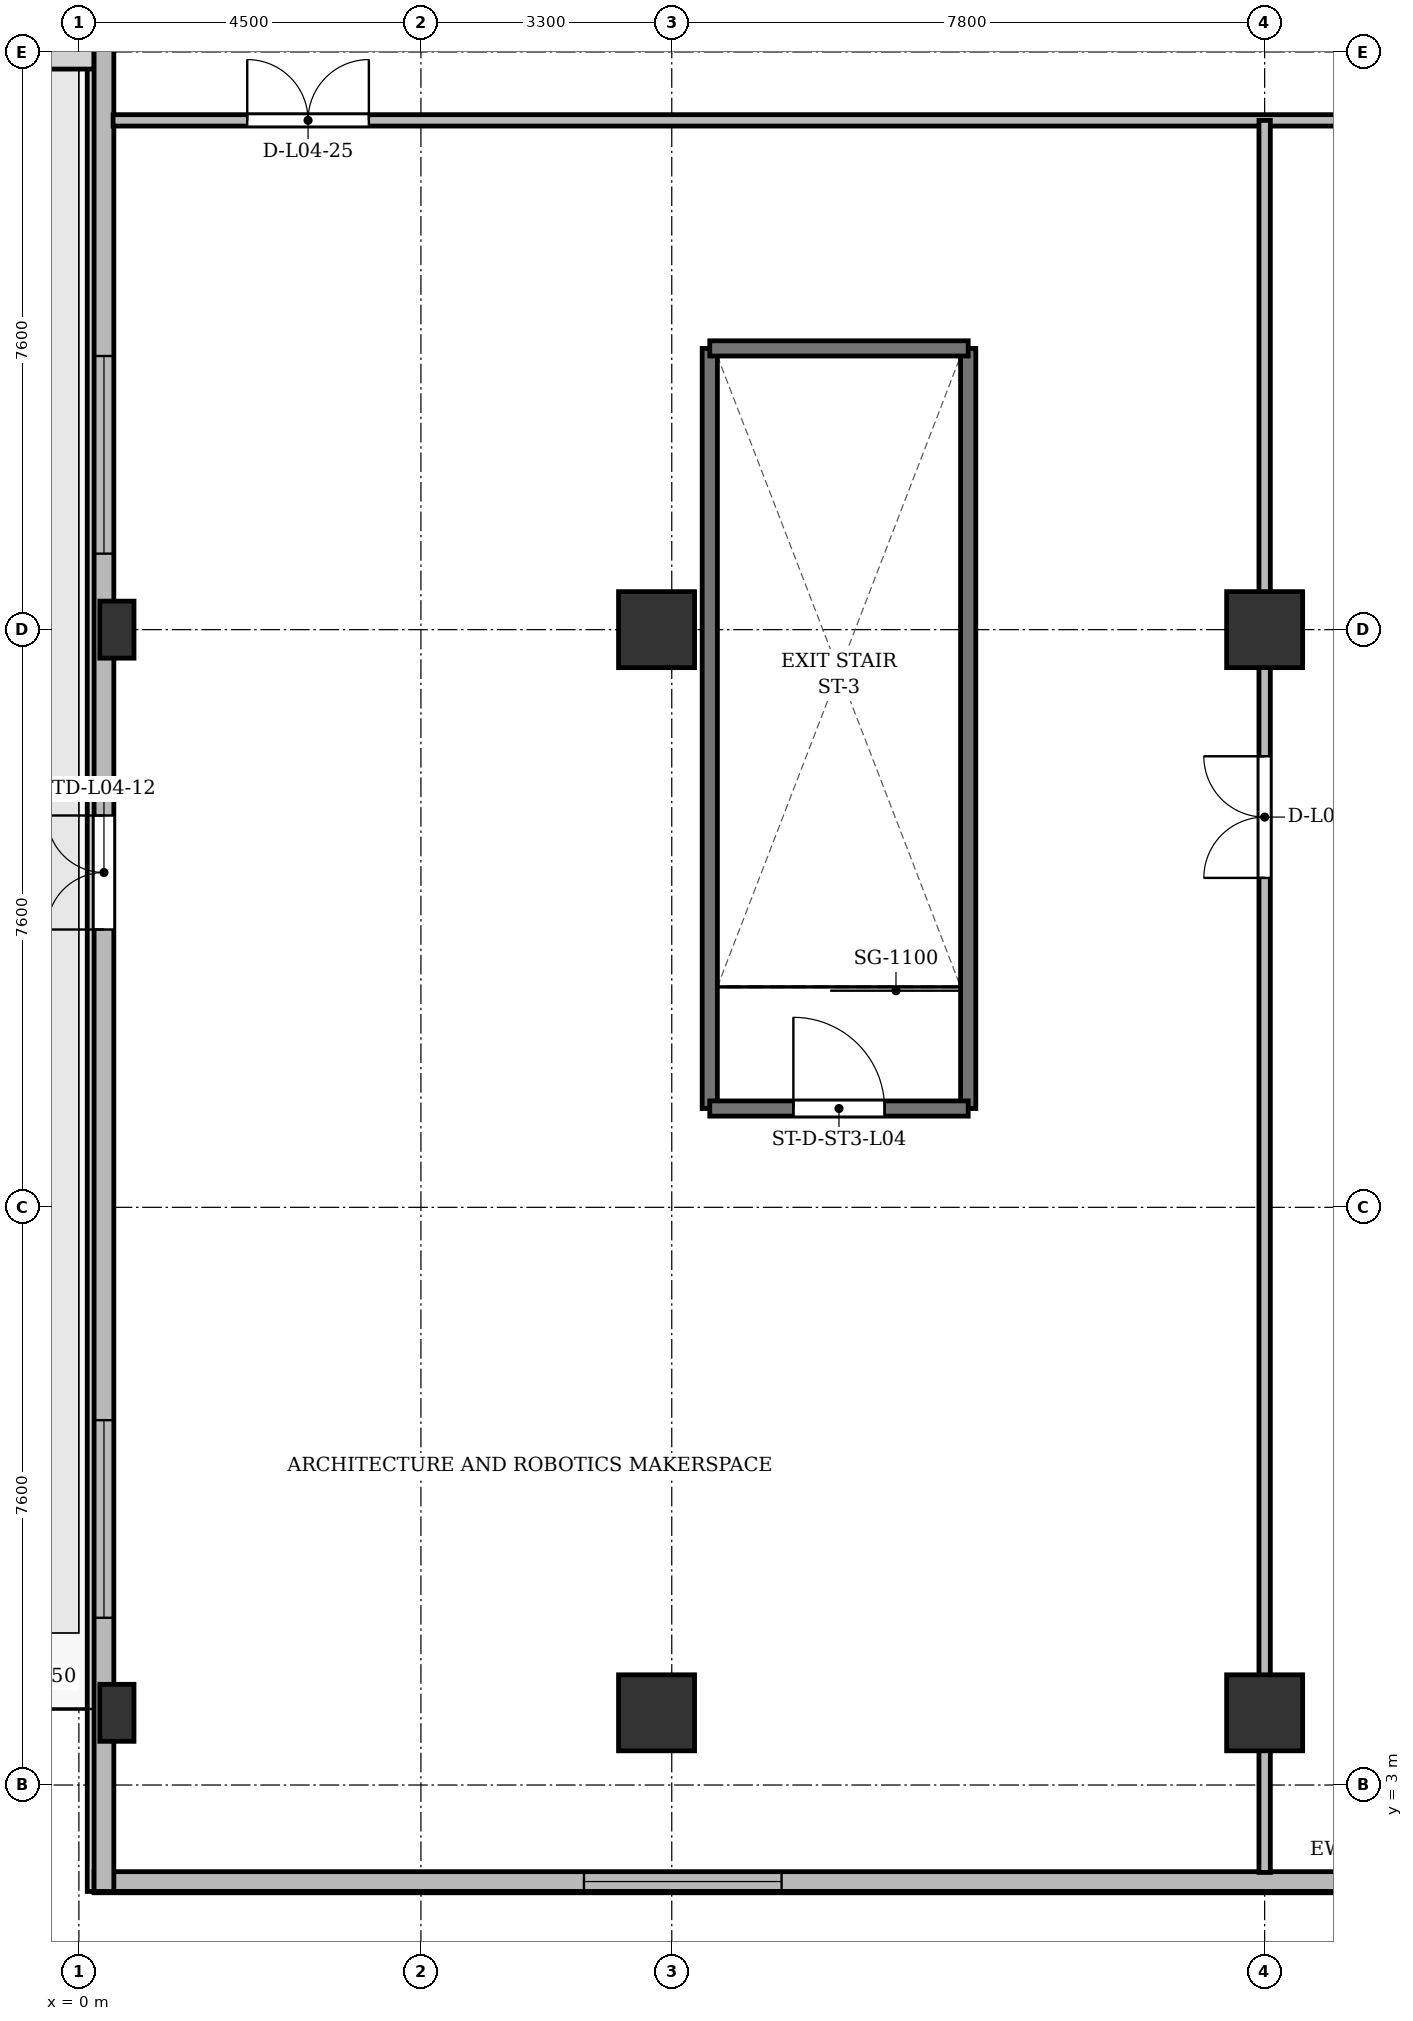
"""IFC4 building model, lengths in metres.
Left out: names, types, materials, properties, quantities, classifications, styles, units other than length and angle.
Written with IfcOpenShell. Run it as: python <this file> out.ifc"""

import sys

from ifc_helpers import new_model, si_unit, direction, frame, frame_2d, origin, origin_2d, place, context, subcontext, project, spatial, rectangle, extrude, source, transform, mapped, element, fill, save


model = new_model("IFC4")
c1 = context("Model", 3, precision=1e-05, world=origin(), true_north=direction((0.0, 1.0)))
c2 = subcontext(c1, "Body", "Model", "MODEL_VIEW")
j1 = project(units=[si_unit("LENGTHUNIT", "METRE"), si_unit("PLANEANGLEUNIT", "RADIAN")], contexts=[c1])
p1 = place(None, origin())
s1 = spatial("IfcSite", under=j1, at=p1, CompositionType="ELEMENT")
p2 = place(p1, origin())
s2 = spatial("IfcBuilding", under=s1, at=p2, CompositionType="ELEMENT")
p3 = place(p2, frame((0.0, 0.0, 18.7)))
s3 = spatial("IfcBuildingStorey", under=s2, at=p3, CompositionType="ELEMENT", Elevation=18.7)
m1 = source(origin(), c2, "Body", "SweptSolid", [
    extrude(rectangle(XDim=0.45, YDim=0.75, at=origin_2d()), origin(), (0.0, 0.0, 1.0), 4.8),
])
for number, where, z_axis, x_axis in (
    (1, (0.5, 3.95, 0.0), (0.0, 0.0, 1.0), (1.0, 0.0, 0.0)),
    (2, (0.5, 18.2, 0.0), (0.0, 0.0, 1.0), (1.0, 0.0, 0.0)),
):
    element("IfcColumn", number, at=place(p3, frame(where, z_axis=z_axis, x_axis=x_axis)), inside=s3, PredefinedType="PILASTER", context=c2, shape_type="MappedRepresentation", body=[
        mapped(m1, transform((0.0, 0.0, 0.0), x_axis=(1.0, 0.0, 0.0), y_axis=(0.0, 1.0, 0.0), z_axis=(0.0, 0.0, 1.0), scale=1.0)),
    ])
m2 = source(origin(), c2, "Body", "SweptSolid", [
    extrude(rectangle(XDim=1.0, YDim=1.0, at=origin_2d()), origin(), (0.0, 0.0, 1.0), 4.8),
])
for number, where, z_axis, x_axis in (
    (3, (7.6, 3.95, 0.0), (0.0, 0.0, 1.0), (1.0, 0.0, 0.0)),
    (4, (7.6, 18.2, 0.0), (0.0, 0.0, 1.0), (1.0, 0.0, 0.0)),
    (5, (15.6, 3.95, 0.0), (0.0, 0.0, 1.0), (1.0, 0.0, 0.0)),
    (6, (15.6, 18.2, 0.0), (0.0, 0.0, 1.0), (1.0, 0.0, 0.0)),
):
    element("IfcColumn", number, at=place(p3, frame(where, z_axis=z_axis, x_axis=x_axis)), inside=s3, PredefinedType="COLUMN", context=c2, shape_type="MappedRepresentation", body=[
        mapped(m2, transform((0.0, 0.0, 0.0), x_axis=(1.0, 0.0, 0.0), y_axis=(0.0, 1.0, 0.0), z_axis=(0.0, 0.0, 1.0), scale=1.0)),
    ])
p4 = place(p3, frame((33.2, 1.73, 0.0), z_axis=(0.0, 0.0, 1.0), x_axis=(-1.0, 0.0, 0.0)))
e7 = element("IfcWall", 7, at=p4, inside=s3, PredefinedType="SOLIDWALL", context=c2, shape_type="SweptSolid", body=[
    extrude(rectangle(XDim=33.0, YDim=0.26, at=frame_2d((16.5, 0.0))), origin(), (0.0, 0.0, 1.0), 4.42),
])
p5 = place(p4, frame((1.345, 0.0, 0.9)))
e8 = element("IfcOpeningElement", 8, at=p5, cuts=e7, PredefinedType="OPENING", context=c2, shape_type="SweptSolid", body=[
    extrude(rectangle(XDim=2.6, YDim=1.9, at=frame_2d((1.3, 0.95))), frame((0.0, 0.14, 0.0), z_axis=(0.0, -1.0, 0.0), x_axis=(1.0, 0.0, 0.0)), (0.0, 0.0, 1.0), 0.28),
])
p6 = place(p4, frame((10.2, 0.0, 0.9)))
e9 = element("IfcOpeningElement", 9, at=p6, cuts=e7, PredefinedType="OPENING", context=c2, shape_type="SweptSolid", body=[
    extrude(rectangle(XDim=2.4, YDim=2.1, at=frame_2d((1.2, 1.05))), frame((0.0, 0.14, 0.0), z_axis=(0.0, -1.0, 0.0), x_axis=(1.0, 0.0, 0.0)), (0.0, 0.0, 1.0), 0.28),
])
p7 = place(p4, frame((23.955, 0.0, 0.9)))
e10 = element("IfcOpeningElement", 10, at=p7, cuts=e7, PredefinedType="OPENING", context=c2, shape_type="SweptSolid", body=[
    extrude(rectangle(XDim=2.6, YDim=1.9, at=frame_2d((1.3, 0.95))), frame((0.0, 0.14, 0.0), z_axis=(0.0, -1.0, 0.0), x_axis=(1.0, 0.0, 0.0)), (0.0, 0.0, 1.0), 0.28),
])
p8 = place(p3, frame((0.33, 1.6, 0.0), z_axis=(0.0, 0.0, 1.0), x_axis=(0.0, 1.0, 0.0)))
e11 = element("IfcWall", 11, at=p8, inside=s3, PredefinedType="SOLIDWALL", context=c2, shape_type="SweptSolid", body=[
    extrude(rectangle(XDim=51.0, YDim=0.26, at=frame_2d((25.5, 0.0))), origin(), (0.0, 0.0, 1.0), 2.62),
])
p9 = place(p8, frame((12.655, 0.0, 0.0)))
e12 = element("IfcOpeningElement", 12, at=p9, cuts=e11, PredefinedType="OPENING", context=c2, shape_type="SweptSolid", body=[
    extrude(rectangle(XDim=1.5, YDim=2.25, at=frame_2d((0.75, 1.125))), frame((0.0, 0.14, 0.0), z_axis=(0.0, -1.0, 0.0), x_axis=(1.0, 0.0, 0.0)), (0.0, 0.0, 1.0), 0.28),
])
p10 = place(p8, frame((3.6, 0.0, 0.92)))
e13 = element("IfcOpeningElement", 13, at=p10, cuts=e11, PredefinedType="OPENING", context=c2, shape_type="SweptSolid", body=[
    extrude(rectangle(XDim=2.6, YDim=1.6, at=frame_2d((1.3, 0.8))), frame((0.0, 0.14, 0.0), z_axis=(0.0, -1.0, 0.0), x_axis=(1.0, 0.0, 0.0)), (0.0, 0.0, 1.0), 0.28),
])
p11 = place(p8, frame((17.6, 0.0, 0.92)))
e14 = element("IfcOpeningElement", 14, at=p11, cuts=e11, PredefinedType="OPENING", context=c2, shape_type="SweptSolid", body=[
    extrude(rectangle(XDim=2.6, YDim=1.6, at=frame_2d((1.3, 0.8))), frame((0.0, 0.14, 0.0), z_axis=(0.0, -1.0, 0.0), x_axis=(1.0, 0.0, 0.0)), (0.0, 0.0, 1.0), 0.28),
])
p12 = place(p8, frame((33.9, 0.0, 0.92)))
e15 = element("IfcOpeningElement", 15, at=p12, cuts=e11, PredefinedType="OPENING", context=c2, shape_type="SweptSolid", body=[
    extrude(rectangle(XDim=2.6, YDim=1.6, at=frame_2d((1.3, 0.8))), frame((0.0, 0.14, 0.0), z_axis=(0.0, -1.0, 0.0), x_axis=(1.0, 0.0, 0.0)), (0.0, 0.0, 1.0), 0.28),
])
p13 = place(p8, frame((40.3, 0.0, 0.92)))
e16 = element("IfcOpeningElement", 16, at=p13, cuts=e11, PredefinedType="OPENING", context=c2, shape_type="SweptSolid", body=[
    extrude(rectangle(XDim=2.6, YDim=1.6, at=frame_2d((1.3, 0.8))), frame((0.0, 0.14, 0.0), z_axis=(0.0, -1.0, 0.0), x_axis=(1.0, 0.0, 0.0)), (0.0, 0.0, 1.0), 0.28),
])
for number, where, z_axis, x_axis in (
    (17, (8.3, 11.9, 0.0), (0.0, 0.0, 1.0), (0.0, 1.0, 0.0)),
    (18, (11.7, 11.9, 0.0), (0.0, 0.0, 1.0), (0.0, 1.0, 0.0)),
):
    element("IfcWall", number, at=place(p3, frame(where, z_axis=z_axis, x_axis=x_axis)), inside=s3, PredefinedType="SHEAR", context=c2, shape_type="SweptSolid", body=[
        extrude(rectangle(XDim=10.0, YDim=0.2, at=frame_2d((5.0, 0.0))), origin(), (0.0, 0.0, 1.0), 4.42),
    ])
p14 = place(p3, frame((8.3, 11.9, 0.0), z_axis=(0.0, 0.0, 1.0), x_axis=(1.0, 0.0, 0.0)))
e19 = element("IfcWall", 19, at=p14, inside=s3, PredefinedType="SHEAR", context=c2, shape_type="SweptSolid", body=[
    extrude(rectangle(XDim=3.4, YDim=0.2, at=frame_2d((1.7, 0.0))), origin(), (0.0, 0.0, 1.0), 4.42),
])
p15 = place(p14, frame((1.1, 0.0, 0.0)))
e20 = element("IfcOpeningElement", 20, at=p15, cuts=e19, PredefinedType="OPENING", context=c2, shape_type="SweptSolid", body=[
    extrude(rectangle(XDim=1.2, YDim=2.15, at=frame_2d((0.6, 1.075))), frame((0.0, 0.11, 0.0), z_axis=(0.0, -1.0, 0.0), x_axis=(1.0, 0.0, 0.0)), (0.0, 0.0, 1.0), 0.22),
])
p16 = place(p3, frame((8.3, 21.9, 0.0), z_axis=(0.0, 0.0, 1.0), x_axis=(1.0, 0.0, 0.0)))
e21 = element("IfcWall", 21, at=p16, inside=s3, PredefinedType="SHEAR", context=c2, shape_type="SweptSolid", body=[
    extrude(rectangle(XDim=3.4, YDim=0.2, at=frame_2d((1.7, 0.0))), origin(), (0.0, 0.0, 1.0), 4.42),
])
p17 = place(p3, frame((0.45, 24.9, 0.0), z_axis=(0.0, 0.0, 1.0), x_axis=(1.0, 0.0, 0.0)))
e22 = element("IfcWall", 22, at=p17, inside=s3, PredefinedType="PARTITIONING", context=c2, shape_type="SweptSolid", body=[
    extrude(rectangle(XDim=73.5, YDim=0.15, at=frame_2d((36.75, 0.0))), origin(), (0.0, 0.0, 1.0), 2.92),
])
p18 = place(p17, frame((1.765, 0.0, 0.0)))
e23 = element("IfcOpeningElement", 23, at=p18, cuts=e22, PredefinedType="OPENING", context=c2, shape_type="SweptSolid", body=[
    extrude(rectangle(XDim=1.6, YDim=2.2, at=frame_2d((0.8, 1.1))), frame((0.0, 0.085, 0.0), z_axis=(0.0, -1.0, 0.0), x_axis=(1.0, 0.0, 0.0)), (0.0, 0.0, 1.0), 0.17),
])
p19 = place(p17, frame((18.459, 0.0, 0.0)))
e24 = element("IfcOpeningElement", 24, at=p19, cuts=e22, PredefinedType="OPENING", context=c2, shape_type="SweptSolid", body=[
    extrude(rectangle(XDim=1.6, YDim=2.2, at=frame_2d((0.8, 1.1))), frame((0.0, 0.085, 0.0), z_axis=(0.0, -1.0, 0.0), x_axis=(1.0, 0.0, 0.0)), (0.0, 0.0, 1.0), 0.17),
])
p20 = place(p17, frame((32.478, 0.0, 0.0)))
e25 = element("IfcOpeningElement", 25, at=p20, cuts=e22, PredefinedType="OPENING", context=c2, shape_type="SweptSolid", body=[
    extrude(rectangle(XDim=1.6, YDim=2.2, at=frame_2d((0.8, 1.1))), frame((0.0, 0.085, 0.0), z_axis=(0.0, -1.0, 0.0), x_axis=(1.0, 0.0, 0.0)), (0.0, 0.0, 1.0), 0.17),
])
p21 = place(p17, frame((46.108, 0.0, 0.0)))
e26 = element("IfcOpeningElement", 26, at=p21, cuts=e22, PredefinedType="OPENING", context=c2, shape_type="SweptSolid", body=[
    extrude(rectangle(XDim=1.6, YDim=2.2, at=frame_2d((0.8, 1.1))), frame((0.0, 0.085, 0.0), z_axis=(0.0, -1.0, 0.0), x_axis=(1.0, 0.0, 0.0)), (0.0, 0.0, 1.0), 0.17),
])
p22 = place(p17, frame((57.594, 0.0, 0.0)))
e27 = element("IfcOpeningElement", 27, at=p22, cuts=e22, PredefinedType="OPENING", context=c2, shape_type="SweptSolid", body=[
    extrude(rectangle(XDim=1.6, YDim=2.2, at=frame_2d((0.8, 1.1))), frame((0.0, 0.085, 0.0), z_axis=(0.0, -1.0, 0.0), x_axis=(1.0, 0.0, 0.0)), (0.0, 0.0, 1.0), 0.17),
])
p23 = place(p17, frame((70.676, 0.0, 0.0)))
e28 = element("IfcOpeningElement", 28, at=p23, cuts=e22, PredefinedType="OPENING", context=c2, shape_type="SweptSolid", body=[
    extrude(rectangle(XDim=1.6, YDim=2.2, at=frame_2d((0.8, 1.1))), frame((0.0, 0.085, 0.0), z_axis=(0.0, -1.0, 0.0), x_axis=(1.0, 0.0, 0.0)), (0.0, 0.0, 1.0), 0.17),
])
p24 = place(p3, frame((15.6, 1.85, 0.0), z_axis=(0.0, 0.0, 1.0), x_axis=(0.0, 1.0, 0.0)))
e29 = element("IfcWall", 29, at=p24, inside=s3, PredefinedType="PARTITIONING", context=c2, shape_type="SweptSolid", body=[
    extrude(rectangle(XDim=23.05, YDim=0.15, at=frame_2d((11.525, 0.0))), origin(), (0.0, 0.0, 1.0), 2.92),
])
p25 = place(p24, frame((13.084, 0.0, 0.0)))
e30 = element("IfcOpeningElement", 30, at=p25, cuts=e29, PredefinedType="OPENING", context=c2, shape_type="SweptSolid", body=[
    extrude(rectangle(XDim=1.6, YDim=2.2, at=frame_2d((0.8, 1.1))), frame((0.0, 0.085, 0.0), z_axis=(0.0, -1.0, 0.0), x_axis=(1.0, 0.0, 0.0)), (0.0, 0.0, 1.0), 0.17),
])
m3 = source(origin(), c2, "Body", "SweptSolid", [
    extrude(rectangle(XDim=2.6, YDim=1.9, at=frame_2d((1.3, 0.95))), frame((0.0, 0.03, 0.0), z_axis=(0.0, -1.0, 0.0), x_axis=(1.0, 0.0, 0.0)), (0.0, 0.0, 1.0), 0.06),
])
p26 = place(p7, origin())
e31 = element("IfcWindow", 31, at=p26, inside=s3, PartitioningType="SINGLE_PANEL", PredefinedType="WINDOW", context=c2, shape_type="MappedRepresentation", body=[
    mapped(m3, transform((0.0, 0.0, 0.0), x_axis=(1.0, 0.0, 0.0), y_axis=(0.0, 1.0, 0.0), z_axis=(0.0, 0.0, 1.0), scale=1.0)),
])
fill(e10, e31)
m4 = source(origin(), c2, "Body", "SweptSolid", [
    extrude(rectangle(XDim=1.5, YDim=2.25, at=frame_2d((0.75, 1.125))), frame((0.0, 0.025, 0.0), z_axis=(0.0, -1.0, 0.0), x_axis=(1.0, 0.0, 0.0)), (0.0, 0.0, 1.0), 0.05),
])
p27 = place(p9, origin())
e32 = element("IfcDoor", 32, at=p27, inside=s3, OperationType="DOUBLE_DOOR_SINGLE_SWING", PredefinedType="DOOR", context=c2, shape_type="MappedRepresentation", body=[
    mapped(m4, transform((0.0, 0.0, 0.0), x_axis=(1.0, 0.0, 0.0), y_axis=(0.0, 1.0, 0.0), z_axis=(0.0, 0.0, 1.0), scale=1.0)),
])
fill(e12, e32)
m5 = source(origin(), c2, "Body", "SweptSolid", [
    extrude(rectangle(XDim=2.6, YDim=1.6, at=frame_2d((1.3, 0.8))), frame((0.0, 0.03, 0.0), z_axis=(0.0, -1.0, 0.0), x_axis=(1.0, 0.0, 0.0)), (0.0, 0.0, 1.0), 0.06),
])
p28 = place(p10, origin())
e33 = element("IfcWindow", 33, at=p28, inside=s3, PartitioningType="SINGLE_PANEL", PredefinedType="WINDOW", context=c2, shape_type="MappedRepresentation", body=[
    mapped(m5, transform((0.0, 0.0, 0.0), x_axis=(1.0, 0.0, 0.0), y_axis=(0.0, 1.0, 0.0), z_axis=(0.0, 0.0, 1.0), scale=1.0)),
])
fill(e13, e33)
p29 = place(p11, origin())
e34 = element("IfcWindow", 34, at=p29, inside=s3, PartitioningType="SINGLE_PANEL", PredefinedType="WINDOW", context=c2, shape_type="MappedRepresentation", body=[
    mapped(m5, transform((0.0, 0.0, 0.0), x_axis=(1.0, 0.0, 0.0), y_axis=(0.0, 1.0, 0.0), z_axis=(0.0, 0.0, 1.0), scale=1.0)),
])
fill(e14, e34)
m6 = source(origin(), c2, "Body", "SweptSolid", [
    extrude(rectangle(XDim=1.2, YDim=2.15, at=frame_2d((0.6, 1.075))), frame((0.0, 0.025, 0.0), z_axis=(0.0, -1.0, 0.0), x_axis=(1.0, 0.0, 0.0)), (0.0, 0.0, 1.0), 0.05),
])
p30 = place(p15, origin())
e35 = element("IfcDoor", 35, at=p30, inside=s3, OperationType="SINGLE_SWING_LEFT", PredefinedType="DOOR", context=c2, shape_type="MappedRepresentation", body=[
    mapped(m6, transform((0.0, 0.0, 0.0), x_axis=(1.0, 0.0, 0.0), y_axis=(0.0, 1.0, 0.0), z_axis=(0.0, 0.0, 1.0), scale=1.0)),
])
fill(e20, e35)
m7 = source(origin(), c2, "Body", "SweptSolid", [
    extrude(rectangle(XDim=1.6, YDim=2.2, at=frame_2d((0.8, 1.1))), frame((0.0, 0.025, 0.0), z_axis=(0.0, -1.0, 0.0), x_axis=(1.0, 0.0, 0.0)), (0.0, 0.0, 1.0), 0.05),
])
p31 = place(p18, origin())
e36 = element("IfcDoor", 36, at=p31, inside=s3, OperationType="DOUBLE_DOOR_SINGLE_SWING", PredefinedType="DOOR", context=c2, shape_type="MappedRepresentation", body=[
    mapped(m7, transform((0.0, 0.0, 0.0), x_axis=(1.0, 0.0, 0.0), y_axis=(0.0, 1.0, 0.0), z_axis=(0.0, 0.0, 1.0), scale=1.0)),
])
fill(e23, e36)
p32 = place(p25, origin())
e37 = element("IfcDoor", 37, at=p32, inside=s3, OperationType="DOUBLE_DOOR_SINGLE_SWING", PredefinedType="DOOR", context=c2, shape_type="MappedRepresentation", body=[
    mapped(m7, transform((0.0, 0.0, 0.0), x_axis=(1.0, 0.0, 0.0), y_axis=(0.0, 1.0, 0.0), z_axis=(0.0, 0.0, 1.0), scale=1.0)),
])
fill(e30, e37)
save(model, sys.argv[1])
